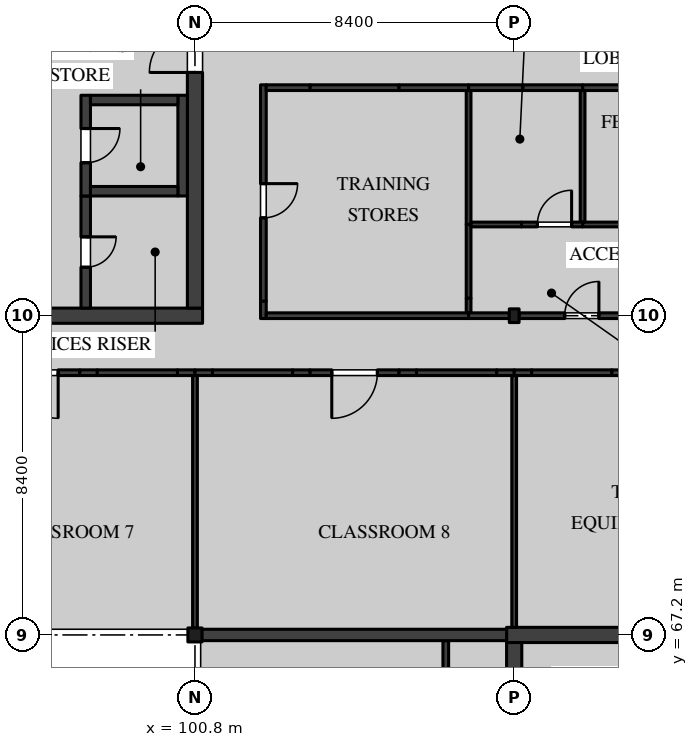
"""IFC4 building model, lengths in metres.
Left out: names, types, materials, properties, quantities, classifications, styles, units other than length and angle.
Written with IfcOpenShell. Run it as: python <this file> out.ifc"""

import sys

from ifc_helpers import new_model, si_unit, direction, frame, frame_2d, origin, origin_2d, place, context, subcontext, project, spatial, rectangle, i_section, extrude, element, fill, save


model = new_model("IFC4")
c1 = context("Model", 3, precision=1e-05, world=origin(), true_north=direction((0.0, 1.0)))
c2 = subcontext(c1, "Body", "Model", "MODEL_VIEW")
j1 = project(units=[si_unit("LENGTHUNIT", "METRE"), si_unit("PLANEANGLEUNIT", "RADIAN")], contexts=[c1])
p1 = place(None, origin())
s1 = spatial("IfcSite", under=j1, at=p1, CompositionType="ELEMENT")
p2 = place(p1, origin())
s2 = spatial("IfcBuilding", under=s1, at=p2, CompositionType="ELEMENT")
p3 = place(p2, frame((0.0, 0.0, 18.9)))
s3 = spatial("IfcBuildingStorey", under=s2, at=p3, CompositionType="ELEMENT", Elevation=18.9)
p4 = place(p3, frame((100.8, 67.2, 0.0), z_axis=(0.0, 0.0, 1.0), x_axis=(1.0, 0.0, 0.0)))
e1 = element("IfcColumn", 1, at=p4, inside=s3, PredefinedType="COLUMN", context=c2, shape_type="SweptSolid", body=[
    extrude(i_section(OverallWidth=0.373, OverallDepth=0.368, WebThickness=0.015, FlangeThickness=0.024, FilletRadius=0.015, at=origin_2d()), origin(), (0.0, 0.0, 1.0), 4.37),
])
p5 = place(p3, frame((109.2, 75.6, 0.0), z_axis=(0.0, 0.0, 1.0), x_axis=(1.0, 0.0, 0.0)))
e2 = element("IfcColumn", 2, at=p5, inside=s3, PredefinedType="COLUMN", context=c2, shape_type="SweptSolid", body=[
    extrude(i_section(OverallWidth=0.257, OverallDepth=0.361, WebThickness=0.011, FlangeThickness=0.02, FilletRadius=0.015, at=origin_2d()), origin(), (0.0, 0.0, 1.0), 4.37),
])
p6 = place(p3, frame((109.0, 67.2, 0.0), z_axis=(0.0, 0.0, 1.0), x_axis=(1.0, 0.0, 0.0)))
e3 = element("IfcWall", 3, at=p6, inside=s3, PredefinedType="SHEAR", context=c2, shape_type="SweptSolid", body=[
    extrude(rectangle(XDim=8.8, YDim=0.4, at=frame_2d((4.4, 0.0))), origin(), (0.0, 0.0, 1.0), 4.37),
])
p7 = place(p3, frame((109.2, 59.0, 0.0), z_axis=(0.0, 0.0, 1.0), x_axis=(0.0, 1.0, 0.0)))
e4 = element("IfcWall", 4, at=p7, inside=s3, PredefinedType="SHEAR", context=c2, shape_type="SweptSolid", body=[
    extrude(rectangle(XDim=8.0, YDim=0.4, at=frame_2d((4.0, 0.0))), origin(), (0.0, 0.0, 1.0), 4.37),
])
p8 = place(p7, frame((2.925, 0.0, 0.0)))
e5 = element("IfcOpeningElement", 5, at=p8, cuts=e4, PredefinedType="OPENING", context=c2, shape_type="SweptSolid", body=[
    extrude(rectangle(XDim=1.2, YDim=2.1, at=frame_2d((0.6, 1.05))), frame((0.0, 0.21, 0.0), z_axis=(0.0, -1.0, 0.0), x_axis=(1.0, 0.0, 0.0)), (0.0, 0.0, 1.0), 0.42),
])
p9 = place(p3, frame((92.2, 75.6, 0.0), z_axis=(0.0, 0.0, 1.0), x_axis=(1.0, 0.0, 0.0)))
e6 = element("IfcWall", 6, at=p9, inside=s3, PredefinedType="SHEAR", context=c2, shape_type="SweptSolid", body=[
    extrude(rectangle(XDim=8.8, YDim=0.4, at=frame_2d((4.4, 0.0))), origin(), (0.0, 0.0, 1.0), 4.37),
])
p10 = place(p3, frame((100.8, 75.8, 0.0), z_axis=(0.0, 0.0, 1.0), x_axis=(0.0, 1.0, 0.0)))
e7 = element("IfcWall", 7, at=p10, inside=s3, PredefinedType="SHEAR", context=c2, shape_type="SweptSolid", body=[
    extrude(rectangle(XDim=8.0, YDim=0.4, at=frame_2d((4.0, 0.0))), origin(), (0.0, 0.0, 1.0), 4.37),
])
p11 = place(p10, frame((6.2, 0.0, 0.0)))
e8 = element("IfcOpeningElement", 8, at=p11, cuts=e7, PredefinedType="OPENING", context=c2, shape_type="SweptSolid", body=[
    extrude(rectangle(XDim=1.2, YDim=2.1, at=frame_2d((0.6, 1.05))), frame((0.0, 0.21, 0.0), z_axis=(0.0, -1.0, 0.0), x_axis=(1.0, 0.0, 0.0)), (0.0, 0.0, 1.0), 0.42),
])
p12 = place(p3, frame((97.925, 78.75, 0.0), z_axis=(0.0, 0.0, 1.0), x_axis=(0.0, -1.0, 0.0)))
e9 = element("IfcWall", 9, at=p12, inside=s3, PredefinedType="SOLIDWALL", context=c2, shape_type="SweptSolid", body=[
    extrude(rectangle(XDim=2.95, YDim=0.25, at=frame_2d((1.475, 0.0))), origin(), (0.0, 0.0, 1.0), 4.37),
])
p13 = place(p12, frame((1.075, 0.0, 0.0)))
e10 = element("IfcOpeningElement", 10, at=p13, cuts=e9, PredefinedType="OPENING", context=c2, shape_type="SweptSolid", body=[
    extrude(rectangle(XDim=0.8, YDim=2.1, at=frame_2d((0.4, 1.05))), frame((0.0, 0.135, 0.0), z_axis=(0.0, -1.0, 0.0), x_axis=(1.0, 0.0, 0.0)), (0.0, 0.0, 1.0), 0.27),
])
p14 = place(p3, frame((97.925, 81.4, 0.0), z_axis=(0.0, 0.0, 1.0), x_axis=(0.0, -1.0, 0.0)))
e11 = element("IfcWall", 11, at=p14, inside=s3, PredefinedType="SOLIDWALL", context=c2, shape_type="SweptSolid", body=[
    extrude(rectangle(XDim=2.65, YDim=0.25, at=frame_2d((1.325, 0.0))), origin(), (0.0, 0.0, 1.0), 4.37),
])
p15 = place(p14, frame((0.875, 0.0, 0.0)))
e12 = element("IfcOpeningElement", 12, at=p15, cuts=e11, PredefinedType="OPENING", context=c2, shape_type="SweptSolid", body=[
    extrude(rectangle(XDim=0.9, YDim=2.1, at=frame_2d((0.45, 1.05))), frame((0.0, 0.135, 0.0), z_axis=(0.0, -1.0, 0.0), x_axis=(1.0, 0.0, 0.0)), (0.0, 0.0, 1.0), 0.27),
])
p16 = place(p3, frame((100.475, 81.4, 0.0), z_axis=(0.0, 0.0, 1.0), x_axis=(0.0, -1.0, 0.0)))
e13 = element("IfcWall", 13, at=p16, inside=s3, PredefinedType="SOLIDWALL", context=c2, shape_type="SweptSolid", body=[
    extrude(rectangle(XDim=2.65, YDim=0.25, at=frame_2d((1.325, 0.0))), origin(), (0.0, 0.0, 1.0), 4.37),
])
for number, where, z_axis, x_axis in (
    (14, (98.05, 81.275, 0.0), (0.0, 0.0, 1.0), (1.0, 0.0, 0.0)),
    (15, (98.05, 78.875, 0.0), (0.0, 0.0, 1.0), (1.0, 0.0, 0.0)),
):
    element("IfcWall", number, at=place(p3, frame(where, z_axis=z_axis, x_axis=x_axis)), inside=s3, PredefinedType="SOLIDWALL", context=c2, shape_type="SweptSolid", body=[
        extrude(rectangle(XDim=2.3, YDim=0.25, at=frame_2d((1.15, 0.0))), origin(), (0.0, 0.0, 1.0), 4.37),
    ])
p17 = place(p3, frame((107.4, 59.26, 0.0), z_axis=(0.0, 0.0, 1.0), x_axis=(0.0, 1.0, 0.0)))
e16 = element("IfcWall", 16, at=p17, inside=s3, PredefinedType="PARTITIONING", context=c2, shape_type="SweptSolid", body=[
    extrude(rectangle(XDim=7.79, YDim=0.15, at=frame_2d((3.895, 0.0))), origin(), (0.0, 0.0, 1.0), 4.37),
])
p18 = place(p17, frame((2.79, 0.0, 0.0)))
e17 = element("IfcOpeningElement", 17, at=p18, cuts=e16, PredefinedType="OPENING", context=c2, shape_type="SweptSolid", body=[
    extrude(rectangle(XDim=1.35, YDim=2.1, at=frame_2d((0.675, 1.05))), frame((0.0, 0.085, 0.0), z_axis=(0.0, -1.0, 0.0), x_axis=(1.0, 0.0, 0.0)), (0.0, 0.0, 1.0), 0.17),
])
p19 = place(p3, frame((108.0, 75.675, 0.0), z_axis=(0.0, 0.0, 1.0), x_axis=(0.0, 1.0, 0.0)))
e18 = element("IfcWall", 18, at=p19, inside=s3, PredefinedType="PARTITIONING", context=c2, shape_type="SweptSolid", body=[
    extrude(rectangle(XDim=0.385, YDim=0.125, at=frame_2d((0.192, 0.0))), origin(), (0.0, 0.0, 1.0), 3.819),
])
p20 = place(p3, frame((108.0, 76.06, 0.0), z_axis=(0.0, 0.0, 1.0), x_axis=(0.0, 1.0, 0.0)))
e19 = element("IfcWall", 19, at=p20, inside=s3, PredefinedType="PARTITIONING", context=c2, shape_type="SweptSolid", body=[
    extrude(rectangle(XDim=1.94, YDim=0.125, at=frame_2d((0.97, 0.0))), origin(), (0.0, 0.0, 1.0), 4.37),
])
p21 = place(p3, frame((108.0, 78.0, 0.0), z_axis=(0.0, 0.0, 1.0), x_axis=(0.0, 1.0, 0.0)))
e20 = element("IfcWall", 20, at=p21, inside=s3, PredefinedType="PARTITIONING", context=c2, shape_type="SweptSolid", body=[
    extrude(rectangle(XDim=3.525, YDim=0.125, at=frame_2d((1.762, 0.0))), origin(), (0.0, 0.0, 1.0), 4.37),
])
p22 = place(p3, frame((102.6, 75.525, 0.0), z_axis=(0.0, 0.0, 1.0), x_axis=(0.0, 1.0, 0.0)))
e21 = element("IfcWall", 21, at=p22, inside=s3, PredefinedType="PARTITIONING", context=c2, shape_type="SweptSolid", body=[
    extrude(rectangle(XDim=0.46, YDim=0.15, at=frame_2d((0.23, 0.0))), origin(), (0.0, 0.0, 1.0), 3.819),
])
p23 = place(p3, frame((102.6, 75.985, 0.0), z_axis=(0.0, 0.0, 1.0), x_axis=(0.0, 1.0, 0.0)))
e22 = element("IfcWall", 22, at=p23, inside=s3, PredefinedType="PARTITIONING", context=c2, shape_type="SweptSolid", body=[
    extrude(rectangle(XDim=5.69, YDim=0.15, at=frame_2d((2.845, 0.0))), origin(), (0.0, 0.0, 1.0), 4.37),
])
p24 = place(p23, frame((2.19, 0.0, 0.0)))
e23 = element("IfcOpeningElement", 23, at=p24, cuts=e22, PredefinedType="OPENING", context=c2, shape_type="SweptSolid", body=[
    extrude(rectangle(XDim=0.9, YDim=2.1, at=frame_2d((0.45, 1.05))), frame((0.0, 0.085, 0.0), z_axis=(0.0, -1.0, 0.0), x_axis=(1.0, 0.0, 0.0)), (0.0, 0.0, 1.0), 0.17),
])
p25 = place(p3, frame((102.675, 75.6, 0.0), z_axis=(0.0, 0.0, 1.0), x_axis=(1.0, 0.0, 0.0)))
e24 = element("IfcWall", 24, at=p25, inside=s3, PredefinedType="PARTITIONING", context=c2, shape_type="SweptSolid", body=[
    extrude(rectangle(XDim=5.325, YDim=0.15, at=frame_2d((2.663, 0.0))), origin(), (0.0, 0.0, 1.0), 3.819),
])
p26 = place(p3, frame((102.675, 81.6, 0.0), z_axis=(0.0, 0.0, 1.0), x_axis=(1.0, 0.0, 0.0)))
e25 = element("IfcWall", 25, at=p26, inside=s3, PredefinedType="PARTITIONING", context=c2, shape_type="SweptSolid", body=[
    extrude(rectangle(XDim=1.155, YDim=0.15, at=frame_2d((0.578, 0.0))), origin(), (0.0, 0.0, 1.0), 3.946),
])
p27 = place(p3, frame((103.83, 81.6, 0.0), z_axis=(0.0, 0.0, 1.0), x_axis=(1.0, 0.0, 0.0)))
e26 = element("IfcWall", 26, at=p27, inside=s3, PredefinedType="PARTITIONING", context=c2, shape_type="SweptSolid", body=[
    extrude(rectangle(XDim=2.34, YDim=0.15, at=frame_2d((1.17, 0.0))), origin(), (0.0, 0.0, 1.0), 4.37),
])
p28 = place(p3, frame((106.17, 81.6, 0.0), z_axis=(0.0, 0.0, 1.0), x_axis=(1.0, 0.0, 0.0)))
e27 = element("IfcWall", 27, at=p28, inside=s3, PredefinedType="PARTITIONING", context=c2, shape_type="SweptSolid", body=[
    extrude(rectangle(XDim=1.83, YDim=0.15, at=frame_2d((0.915, 0.0))), origin(), (0.0, 0.0, 1.0), 3.946),
])
p29 = place(p3, frame((111.0, 78.0, 0.0), z_axis=(0.0, 0.0, 1.0), x_axis=(1.0, 0.0, 0.0)))
e28 = element("IfcWall", 28, at=p29, inside=s3, PredefinedType="PARTITIONING", context=c2, shape_type="SweptSolid", body=[
    extrude(rectangle(XDim=1.192, YDim=0.125, at=frame_2d((0.596, 0.0))), origin(), (0.0, 0.0, 1.0), 3.946),
])
p30 = place(p3, frame((111.0, 78.062, 0.0), z_axis=(0.0, 0.0, 1.0), x_axis=(0.0, 1.0, 0.0)))
e29 = element("IfcWall", 29, at=p30, inside=s3, PredefinedType="PARTITIONING", context=c2, shape_type="SweptSolid", body=[
    extrude(rectangle(XDim=3.463, YDim=0.125, at=frame_2d((1.731, 0.0))), origin(), (0.0, 0.0, 1.0), 4.37),
])
p31 = place(p3, frame((111.0, 81.6, 0.0), z_axis=(0.0, 0.0, 1.0), x_axis=(1.0, 0.0, 0.0)))
e30 = element("IfcWall", 30, at=p31, inside=s3, PredefinedType="PARTITIONING", context=c2, shape_type="SweptSolid", body=[
    extrude(rectangle(XDim=1.23, YDim=0.15, at=frame_2d((0.615, 0.0))), origin(), (0.0, 0.0, 1.0), 3.946),
])
p32 = place(p3, frame((108.062, 78.0, 0.0), z_axis=(0.0, 0.0, 1.0), x_axis=(1.0, 0.0, 0.0)))
e31 = element("IfcWall", 31, at=p32, inside=s3, PredefinedType="PARTITIONING", context=c2, shape_type="SweptSolid", body=[
    extrude(rectangle(XDim=1.33, YDim=0.125, at=frame_2d((0.665, 0.0))), origin(), (0.0, 0.0, 1.0), 3.819),
])
p33 = place(p3, frame((109.392, 78.0, 0.0), z_axis=(0.0, 0.0, 1.0), x_axis=(1.0, 0.0, 0.0)))
e32 = element("IfcWall", 32, at=p33, inside=s3, PredefinedType="PARTITIONING", context=c2, shape_type="SweptSolid", body=[
    extrude(rectangle(XDim=1.608, YDim=0.125, at=frame_2d((0.804, 0.0))), origin(), (0.0, 0.0, 1.0), 4.37),
])
p34 = place(p33, frame((0.419, 0.0, 0.0)))
e33 = element("IfcOpeningElement", 33, at=p34, cuts=e32, PredefinedType="OPENING", context=c2, shape_type="SweptSolid", body=[
    extrude(rectangle(XDim=0.9, YDim=2.1, at=frame_2d((0.45, 1.05))), frame((0.0, 0.073, 0.0), z_axis=(0.0, -1.0, 0.0), x_axis=(1.0, 0.0, 0.0)), (0.0, 0.0, 1.0), 0.145),
])
p35 = place(p3, frame((108.0, 75.6, 0.0), z_axis=(0.0, 0.0, 1.0), x_axis=(1.0, 0.0, 0.0)))
e34 = element("IfcWall", 34, at=p35, inside=s3, PredefinedType="PARTITIONING", context=c2, shape_type="SweptSolid", body=[
    extrude(rectangle(XDim=1.072, YDim=0.15, at=frame_2d((0.536, 0.0))), origin(), (0.0, 0.0, 1.0), 3.819),
])
p36 = place(p3, frame((109.329, 75.6, 0.0), z_axis=(0.0, 0.0, 1.0), x_axis=(1.0, 0.0, 0.0)))
e35 = element("IfcWall", 35, at=p36, inside=s3, PredefinedType="PARTITIONING", context=c2, shape_type="SweptSolid", body=[
    extrude(rectangle(XDim=7.071, YDim=0.15, at=frame_2d((3.535, 0.0))), origin(), (0.0, 0.0, 1.0), 3.819),
])
p37 = place(p36, frame((1.2, 0.0, 0.0)))
e36 = element("IfcOpeningElement", 36, at=p37, cuts=e35, PredefinedType="OPENING", context=c2, shape_type="SweptSolid", body=[
    extrude(rectangle(XDim=0.9, YDim=2.1, at=frame_2d((0.45, 1.05))), frame((0.0, 0.085, 0.0), z_axis=(0.0, -1.0, 0.0), x_axis=(1.0, 0.0, 0.0)), (0.0, 0.0, 1.0), 0.17),
])
p38 = place(p3, frame((108.0, 81.6, 0.0), z_axis=(0.0, 0.0, 1.0), x_axis=(1.0, 0.0, 0.0)))
e37 = element("IfcWall", 37, at=p38, inside=s3, PredefinedType="PARTITIONING", context=c2, shape_type="SweptSolid", body=[
    extrude(rectangle(XDim=1.43, YDim=0.15, at=frame_2d((0.715, 0.0))), origin(), (0.0, 0.0, 1.0), 3.819),
])
p39 = place(p3, frame((109.43, 81.6, 0.0), z_axis=(0.0, 0.0, 1.0), x_axis=(1.0, 0.0, 0.0)))
e38 = element("IfcWall", 38, at=p39, inside=s3, PredefinedType="PARTITIONING", context=c2, shape_type="SweptSolid", body=[
    extrude(rectangle(XDim=1.57, YDim=0.15, at=frame_2d((0.785, 0.0))), origin(), (0.0, 0.0, 1.0), 4.37),
])
p40 = place(p3, frame((95.43, 74.1, 0.0), z_axis=(0.0, 0.0, 1.0), x_axis=(1.0, 0.0, 0.0)))
e39 = element("IfcWall", 39, at=p40, inside=s3, PredefinedType="PARTITIONING", context=c2, shape_type="SweptSolid", body=[
    extrude(rectangle(XDim=2.34, YDim=0.15, at=frame_2d((1.17, 0.0))), origin(), (0.0, 0.0, 1.0), 4.37),
])
p41 = place(p40, frame((0.57, 0.0, 0.0)))
e40 = element("IfcOpeningElement", 40, at=p41, cuts=e39, PredefinedType="OPENING", context=c2, shape_type="SweptSolid", body=[
    extrude(rectangle(XDim=1.2, YDim=2.4, at=frame_2d((0.6, 1.2))), frame((0.0, 0.085, 0.0), z_axis=(0.0, -1.0, 0.0), x_axis=(1.0, 0.0, 0.0)), (0.0, 0.0, 1.0), 0.17),
])
p42 = place(p3, frame((97.77, 74.1, 0.0), z_axis=(0.0, 0.0, 1.0), x_axis=(1.0, 0.0, 0.0)))
e41 = element("IfcWall", 41, at=p42, inside=s3, PredefinedType="PARTITIONING", context=c2, shape_type="SweptSolid", body=[
    extrude(rectangle(XDim=0.46, YDim=0.15, at=frame_2d((0.23, 0.0))), origin(), (0.0, 0.0, 1.0), 3.946),
])
p43 = place(p3, frame((98.23, 74.1, 0.0), z_axis=(0.0, 0.0, 1.0), x_axis=(1.0, 0.0, 0.0)))
e42 = element("IfcWall", 42, at=p43, inside=s3, PredefinedType="PARTITIONING", context=c2, shape_type="SweptSolid", body=[
    extrude(rectangle(XDim=2.11, YDim=0.15, at=frame_2d((1.055, 0.0))), origin(), (0.0, 0.0, 1.0), 4.37),
])
for number, where, z_axis, x_axis in (
    (43, (100.34, 74.1, 0.0), (0.0, 0.0, 1.0), (1.0, 0.0, 0.0)),
    (44, (100.8, 74.1, 0.0), (0.0, 0.0, 1.0), (1.0, 0.0, 0.0)),
):
    element("IfcWall", number, at=place(p3, frame(where, z_axis=z_axis, x_axis=x_axis)), inside=s3, PredefinedType="PARTITIONING", context=c2, shape_type="SweptSolid", body=[
        extrude(rectangle(XDim=0.46, YDim=0.15, at=frame_2d((0.23, 0.0))), origin(), (0.0, 0.0, 1.0), 3.819),
    ])
p44 = place(p3, frame((101.26, 74.1, 0.0), z_axis=(0.0, 0.0, 1.0), x_axis=(1.0, 0.0, 0.0)))
e45 = element("IfcWall", 45, at=p44, inside=s3, PredefinedType="PARTITIONING", context=c2, shape_type="SweptSolid", body=[
    extrude(rectangle(XDim=2.11, YDim=0.15, at=frame_2d((1.055, 0.0))), origin(), (0.0, 0.0, 1.0), 4.37),
])
p45 = place(p3, frame((103.37, 74.1, 0.0), z_axis=(0.0, 0.0, 1.0), x_axis=(1.0, 0.0, 0.0)))
e46 = element("IfcWall", 46, at=p45, inside=s3, PredefinedType="PARTITIONING", context=c2, shape_type="SweptSolid", body=[
    extrude(rectangle(XDim=0.46, YDim=0.15, at=frame_2d((0.23, 0.0))), origin(), (0.0, 0.0, 1.0), 3.946),
])
p46 = place(p3, frame((103.83, 74.1, 0.0), z_axis=(0.0, 0.0, 1.0), x_axis=(1.0, 0.0, 0.0)))
e47 = element("IfcWall", 47, at=p46, inside=s3, PredefinedType="PARTITIONING", context=c2, shape_type="SweptSolid", body=[
    extrude(rectangle(XDim=2.34, YDim=0.15, at=frame_2d((1.17, 0.0))), origin(), (0.0, 0.0, 1.0), 4.37),
])
p47 = place(p46, frame((0.57, 0.0, 0.0)))
e48 = element("IfcOpeningElement", 48, at=p47, cuts=e47, PredefinedType="OPENING", context=c2, shape_type="SweptSolid", body=[
    extrude(rectangle(XDim=1.2, YDim=2.4, at=frame_2d((0.6, 1.2))), frame((0.0, 0.085, 0.0), z_axis=(0.0, -1.0, 0.0), x_axis=(1.0, 0.0, 0.0)), (0.0, 0.0, 1.0), 0.17),
])
p48 = place(p3, frame((106.17, 74.1, 0.0), z_axis=(0.0, 0.0, 1.0), x_axis=(1.0, 0.0, 0.0)))
e49 = element("IfcWall", 49, at=p48, inside=s3, PredefinedType="PARTITIONING", context=c2, shape_type="SweptSolid", body=[
    extrude(rectangle(XDim=0.46, YDim=0.15, at=frame_2d((0.23, 0.0))), origin(), (0.0, 0.0, 1.0), 3.946),
])
p49 = place(p3, frame((106.63, 74.1, 0.0), z_axis=(0.0, 0.0, 1.0), x_axis=(1.0, 0.0, 0.0)))
e50 = element("IfcWall", 50, at=p49, inside=s3, PredefinedType="PARTITIONING", context=c2, shape_type="SweptSolid", body=[
    extrude(rectangle(XDim=2.11, YDim=0.15, at=frame_2d((1.055, 0.0))), origin(), (0.0, 0.0, 1.0), 4.37),
])
for number, where, z_axis, x_axis in (
    (51, (108.74, 74.1, 0.0), (0.0, 0.0, 1.0), (1.0, 0.0, 0.0)),
    (52, (109.2, 74.1, 0.0), (0.0, 0.0, 1.0), (1.0, 0.0, 0.0)),
):
    element("IfcWall", number, at=place(p3, frame(where, z_axis=z_axis, x_axis=x_axis)), inside=s3, PredefinedType="PARTITIONING", context=c2, shape_type="SweptSolid", body=[
        extrude(rectangle(XDim=0.46, YDim=0.15, at=frame_2d((0.23, 0.0))), origin(), (0.0, 0.0, 1.0), 3.819),
    ])
p50 = place(p3, frame((109.66, 74.1, 0.0), z_axis=(0.0, 0.0, 1.0), x_axis=(1.0, 0.0, 0.0)))
e53 = element("IfcWall", 53, at=p50, inside=s3, PredefinedType="PARTITIONING", context=c2, shape_type="SweptSolid", body=[
    extrude(rectangle(XDim=2.11, YDim=0.15, at=frame_2d((1.055, 0.0))), origin(), (0.0, 0.0, 1.0), 4.37),
])
p51 = place(p3, frame((111.77, 74.1, 0.0), z_axis=(0.0, 0.0, 1.0), x_axis=(1.0, 0.0, 0.0)))
e54 = element("IfcWall", 54, at=p51, inside=s3, PredefinedType="PARTITIONING", context=c2, shape_type="SweptSolid", body=[
    extrude(rectangle(XDim=0.46, YDim=0.15, at=frame_2d((0.23, 0.0))), origin(), (0.0, 0.0, 1.0), 3.946),
])
p52 = place(p3, frame((100.8, 67.384, 0.0), z_axis=(0.0, 0.0, 1.0), x_axis=(0.0, 1.0, 0.0)))
e55 = element("IfcWall", 55, at=p52, inside=s3, PredefinedType="PARTITIONING", context=c2, shape_type="SweptSolid", body=[
    extrude(rectangle(XDim=6.641, YDim=0.125, at=frame_2d((3.32, 0.0))), origin(), (0.0, 0.0, 1.0), 3.819),
])
p53 = place(p3, frame((109.2, 67.4, 0.0), z_axis=(0.0, 0.0, 1.0), x_axis=(0.0, 1.0, 0.0)))
e56 = element("IfcWall", 56, at=p53, inside=s3, PredefinedType="PARTITIONING", context=c2, shape_type="SweptSolid", body=[
    extrude(rectangle(XDim=6.625, YDim=0.125, at=frame_2d((3.312, 0.0))), origin(), (0.0, 0.0, 1.0), 3.819),
])
p54 = place(p3, frame((109.0, 67.2, 0.0), z_axis=(0.0, 0.0, 1.0), x_axis=(-1.0, 0.0, 0.0)))
e57 = element("IfcWall", 57, at=p54, inside=s3, PredefinedType="SOLIDWALL", context=c2, shape_type="SweptSolid", body=[
    extrude(rectangle(XDim=8.197, YDim=0.3, at=frame_2d((4.099, 0.0))), origin(), (0.0, 0.0, 1.0), 3.746),
])
p55 = place(p11, origin())
e58 = element("IfcDoor", 58, at=p55, inside=s3, OperationType="SINGLE_SWING_RIGHT", PredefinedType="DOOR", context=c2, shape_type="SweptSolid", body=[
    extrude(rectangle(XDim=1.2, YDim=2.1, at=frame_2d((0.6, 1.05))), frame((0.0, 0.035, 0.0), z_axis=(0.0, -1.0, 0.0), x_axis=(1.0, 0.0, 0.0)), (0.0, 0.0, 1.0), 0.07),
])
fill(e8, e58)
p56 = place(p15, origin())
e59 = element("IfcDoor", 59, at=p56, inside=s3, OperationType="SINGLE_SWING_RIGHT", PredefinedType="DOOR", context=c2, shape_type="SweptSolid", body=[
    extrude(rectangle(XDim=0.9, YDim=2.1, at=frame_2d((0.45, 1.05))), frame((0.0, 0.035, 0.0), z_axis=(0.0, -1.0, 0.0), x_axis=(1.0, 0.0, 0.0)), (0.0, 0.0, 1.0), 0.07),
])
fill(e12, e59)
p57 = place(p13, origin())
e60 = element("IfcDoor", 60, at=p57, inside=s3, OperationType="SINGLE_SWING_RIGHT", PredefinedType="DOOR", context=c2, shape_type="SweptSolid", body=[
    extrude(rectangle(XDim=0.8, YDim=2.1, at=frame_2d((0.4, 1.05))), frame((0.0, 0.035, 0.0), z_axis=(0.0, -1.0, 0.0), x_axis=(1.0, 0.0, 0.0)), (0.0, 0.0, 1.0), 0.07),
])
fill(e10, e60)
p58 = place(p24, frame((0.9, 0.0, 0.0), z_axis=(0.0, 0.0, 1.0), x_axis=(-1.0, 0.0, 0.0)))
e61 = element("IfcDoor", 61, at=p58, inside=s3, OperationType="SINGLE_SWING_RIGHT", PredefinedType="DOOR", context=c2, shape_type="SweptSolid", body=[
    extrude(rectangle(XDim=0.9, YDim=2.1, at=frame_2d((0.45, 1.05))), frame((0.0, 0.025, 0.0), z_axis=(0.0, -1.0, 0.0), x_axis=(1.0, 0.0, 0.0)), (0.0, 0.0, 1.0), 0.05),
])
fill(e23, e61)
p59 = place(p37, origin())
e62 = element("IfcDoor", 62, at=p59, inside=s3, OperationType="SINGLE_SWING_LEFT", PredefinedType="DOOR", context=c2, shape_type="SweptSolid", body=[
    extrude(rectangle(XDim=0.9, YDim=2.1, at=frame_2d((0.45, 1.05))), frame((0.0, 0.025, 0.0), z_axis=(0.0, -1.0, 0.0), x_axis=(1.0, 0.0, 0.0)), (0.0, 0.0, 1.0), 0.05),
])
fill(e36, e62)
p60 = place(p34, origin())
e63 = element("IfcDoor", 63, at=p60, inside=s3, OperationType="SINGLE_SWING_LEFT", PredefinedType="DOOR", context=c2, shape_type="SweptSolid", body=[
    extrude(rectangle(XDim=0.9, YDim=2.1, at=frame_2d((0.45, 1.05))), frame((0.0, 0.02, 0.0), z_axis=(0.0, -1.0, 0.0), x_axis=(1.0, 0.0, 0.0)), (0.0, 0.0, 1.0), 0.04),
])
fill(e33, e63)
p61 = place(p41, frame((1.2, 0.0, 0.0), z_axis=(0.0, 0.0, 1.0), x_axis=(-1.0, 0.0, 0.0)))
e64 = element("IfcDoor", 64, at=p61, inside=s3, OperationType="SINGLE_SWING_RIGHT", PredefinedType="DOOR", context=c2, shape_type="SweptSolid", body=[
    extrude(rectangle(XDim=1.2, YDim=2.4, at=frame_2d((0.6, 1.2))), frame((0.0, 0.025, 0.0), z_axis=(0.0, -1.0, 0.0), x_axis=(1.0, 0.0, 0.0)), (0.0, 0.0, 1.0), 0.05),
])
fill(e40, e64)
p62 = place(p47, frame((1.2, 0.0, 0.0), z_axis=(0.0, 0.0, 1.0), x_axis=(-1.0, 0.0, 0.0)))
e65 = element("IfcDoor", 65, at=p62, inside=s3, OperationType="SINGLE_SWING_LEFT", PredefinedType="DOOR", context=c2, shape_type="SweptSolid", body=[
    extrude(rectangle(XDim=1.2, YDim=2.4, at=frame_2d((0.6, 1.2))), frame((0.0, 0.025, 0.0), z_axis=(0.0, -1.0, 0.0), x_axis=(1.0, 0.0, 0.0)), (0.0, 0.0, 1.0), 0.05),
])
fill(e48, e65)
save(model, sys.argv[1])
